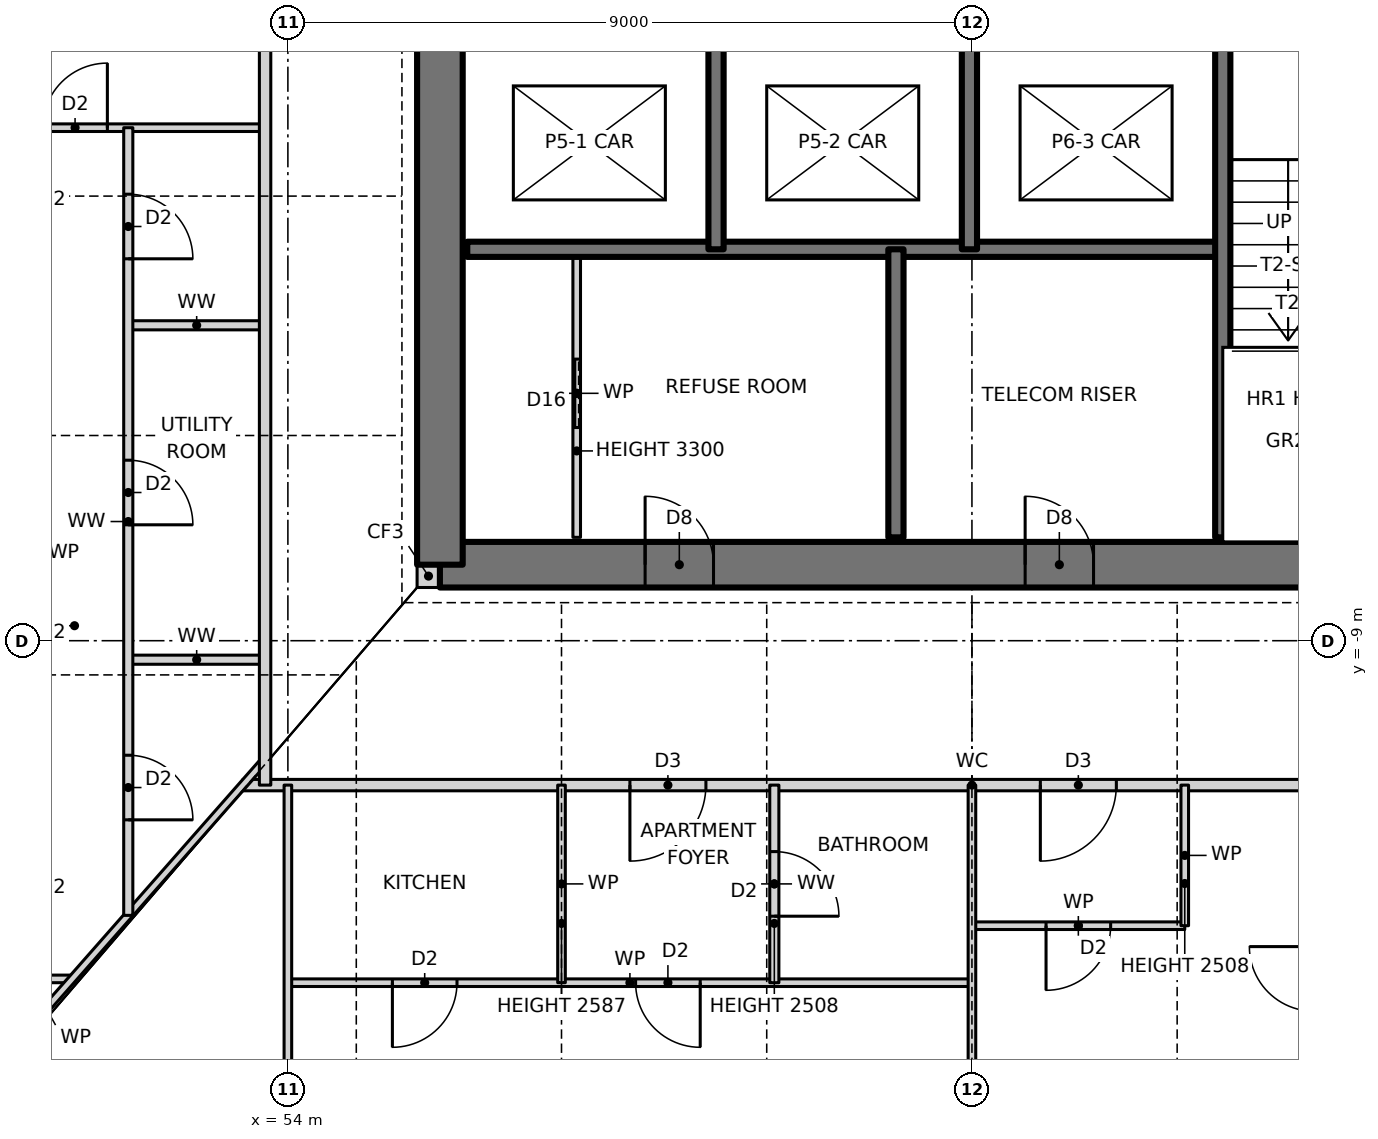
"""IFC4 building model, lengths in metres.
Left out: names, types, materials, properties, quantities, classifications, styles, units other than length and angle.
Written with IfcOpenShell. Run it as: python <this file> out.ifc"""

import sys

from ifc_helpers import new_model, si_unit, direction, frame, frame_2d, origin, place, context, subcontext, project, spatial, rectangle, extrude, element, fill, save


model = new_model("IFC4")
c1 = context("Model", 3, precision=1e-05, world=origin(), true_north=direction((0.0, 1.0)))
c2 = subcontext(c1, "Body", "Model", "MODEL_VIEW")
j1 = project(units=[si_unit("LENGTHUNIT", "METRE"), si_unit("PLANEANGLEUNIT", "RADIAN")], contexts=[c1])
p1 = place(None, origin())
s1 = spatial("IfcSite", under=j1, at=p1, CompositionType="ELEMENT")
p2 = place(p1, origin())
s2 = spatial("IfcBuilding", under=s1, at=p2, CompositionType="ELEMENT")
p3 = place(p2, frame((0.0, 0.0, 64.0)))
s3 = spatial("IfcBuildingStorey", under=s2, at=p3, CompositionType="ELEMENT", Elevation=64.0)
p4 = place(p3, frame((55.7, -8.15, 0.0), z_axis=(0.0, 0.0, 1.0), x_axis=(1.0, 0.0, 0.0)))
e1 = element("IfcWall", 1, at=p4, inside=s3, PredefinedType="SOLIDWALL", context=c2, shape_type="SweptSolid", body=[
    extrude(rectangle(XDim=0.3, YDim=0.3, at=frame_2d((0.15, 0.0))), origin(), (0.0, 0.0, 1.0), 3.5),
])
p5 = place(p3, frame((56.0, -8.0, 0.0), z_axis=(0.0, 0.0, 1.0), x_axis=(1.0, 0.0, 0.0)))
e2 = element("IfcWall", 2, at=p5, inside=s3, PredefinedType="SHEAR", context=c2, shape_type="SweptSolid", body=[
    extrude(rectangle(XDim=14.0, YDim=0.6, at=frame_2d((7.0, 0.0))), origin(), (0.0, 0.0, 1.0), 3.5),
])
p6 = place(p5, frame((2.7, 0.0, 0.0)))
e3 = element("IfcOpeningElement", 3, at=p6, cuts=e2, PredefinedType="OPENING", context=c2, shape_type="SweptSolid", body=[
    extrude(rectangle(XDim=0.9, YDim=2.1, at=frame_2d((0.45, 1.05))), frame((0.0, 0.31, 0.0), z_axis=(0.0, -1.0, 0.0), x_axis=(1.0, 0.0, 0.0)), (0.0, 0.0, 1.0), 0.62),
])
p7 = place(p5, frame((7.7, 0.0, 0.0)))
e4 = element("IfcOpeningElement", 4, at=p7, cuts=e2, PredefinedType="OPENING", context=c2, shape_type="SweptSolid", body=[
    extrude(rectangle(XDim=0.9, YDim=2.1, at=frame_2d((0.45, 1.05))), frame((0.0, 0.31, 0.0), z_axis=(0.0, -1.0, 0.0), x_axis=(1.0, 0.0, 0.0)), (0.0, 0.0, 1.0), 0.62),
])
p8 = place(p3, frame((56.0, 8.0, 0.0), z_axis=(0.0, 0.0, 1.0), x_axis=(0.0, -1.0, 0.0)))
e5 = element("IfcWall", 5, at=p8, inside=s3, PredefinedType="SHEAR", context=c2, shape_type="SweptSolid", body=[
    extrude(rectangle(XDim=16.0, YDim=0.6, at=frame_2d((8.0, 0.0))), origin(), (0.0, 0.0, 1.0), 3.5),
])
p9 = place(p8, frame((7.5, 0.0, 0.0)))
e6 = element("IfcOpeningElement", 6, at=p9, cuts=e5, PredefinedType="OPENING", context=c2, shape_type="SweptSolid", body=[
    extrude(rectangle(XDim=1.0, YDim=2.1, at=frame_2d((0.5, 1.05))), frame((0.0, 0.31, 0.0), z_axis=(0.0, -1.0, 0.0), x_axis=(1.0, 0.0, 0.0)), (0.0, 0.0, 1.0), 0.62),
])
p10 = place(p3, frame((54.0, -13.5, 0.0), z_axis=(0.0, 0.0, 1.0), x_axis=(1.0, 0.0, 0.0)))
e7 = element("IfcWall", 7, at=p10, inside=s3, PredefinedType="PARTITIONING", context=c2, shape_type="SweptSolid", body=[
    extrude(rectangle(XDim=9.0, YDim=0.1, at=frame_2d((4.5, 0.0))), origin(), (0.0, 0.0, 1.0), 3.27),
])
p11 = place(p10, frame((1.375, 0.0, 0.0)))
e8 = element("IfcOpeningElement", 8, at=p11, cuts=e7, PredefinedType="OPENING", context=c2, shape_type="SweptSolid", body=[
    extrude(rectangle(XDim=0.85, YDim=2.1, at=frame_2d((0.425, 1.05))), frame((0.0, 0.06, 0.0), z_axis=(0.0, -1.0, 0.0), x_axis=(1.0, 0.0, 0.0)), (0.0, 0.0, 1.0), 0.12),
])
p12 = place(p10, frame((4.575, 0.0, 0.0)))
e9 = element("IfcOpeningElement", 9, at=p12, cuts=e7, PredefinedType="OPENING", context=c2, shape_type="SweptSolid", body=[
    extrude(rectangle(XDim=0.85, YDim=2.1, at=frame_2d((0.425, 1.05))), frame((0.0, 0.06, 0.0), z_axis=(0.0, -1.0, 0.0), x_axis=(1.0, 0.0, 0.0)), (0.0, 0.0, 1.0), 0.12),
])
p13 = place(p3, frame((50.5, -13.45, 0.0), z_axis=(0.0, 0.0, 1.0), x_axis=(1.0, 0.0, 0.0)))
e10 = element("IfcWall", 10, at=p13, inside=s3, PredefinedType="PARTITIONING", context=c2, shape_type="SweptSolid", body=[
    extrude(rectangle(XDim=0.664, YDim=0.1, at=frame_2d((0.332, 0.0))), origin(), (0.0, 0.0, 1.0), 3.27),
])
p14 = place(p3, frame((63.0, -12.75, 0.0), z_axis=(0.0, 0.0, 1.0), x_axis=(1.0, 0.0, 0.0)))
e11 = element("IfcWall", 11, at=p14, inside=s3, PredefinedType="PARTITIONING", context=c2, shape_type="SweptSolid", body=[
    extrude(rectangle(XDim=2.8, YDim=0.1, at=frame_2d((1.4, 0.0))), origin(), (0.0, 0.0, 1.0), 3.27),
])
p15 = place(p14, frame((0.975, 0.0, 0.0)))
e12 = element("IfcOpeningElement", 12, at=p15, cuts=e11, PredefinedType="OPENING", context=c2, shape_type="SweptSolid", body=[
    extrude(rectangle(XDim=0.85, YDim=2.1, at=frame_2d((0.425, 1.05))), frame((0.0, 0.06, 0.0), z_axis=(0.0, -1.0, 0.0), x_axis=(1.0, 0.0, 0.0)), (0.0, 0.0, 1.0), 0.12),
])
p16 = place(p3, frame((53.408, -10.9, 0.0), z_axis=(0.0, 0.0, 1.0), x_axis=(1.0, 0.0, 0.0)))
e13 = element("IfcWall", 13, at=p16, inside=s3, PredefinedType="PARTITIONING", context=c2, shape_type="SweptSolid", body=[
    extrude(rectangle(XDim=19.184, YDim=0.15, at=frame_2d((9.592, 0.0))), origin(), (0.0, 0.0, 1.0), 3.27),
])
p17 = place(p16, frame((5.092, 0.0, 0.0)))
e14 = element("IfcOpeningElement", 14, at=p17, cuts=e13, PredefinedType="OPENING", context=c2, shape_type="SweptSolid", body=[
    extrude(rectangle(XDim=1.0, YDim=2.1, at=frame_2d((0.5, 1.05))), frame((0.0, 0.085, 0.0), z_axis=(0.0, -1.0, 0.0), x_axis=(1.0, 0.0, 0.0)), (0.0, 0.0, 1.0), 0.17),
])
p18 = place(p16, frame((10.492, 0.0, 0.0)))
e15 = element("IfcOpeningElement", 15, at=p18, cuts=e13, PredefinedType="OPENING", context=c2, shape_type="SweptSolid", body=[
    extrude(rectangle(XDim=1.0, YDim=2.1, at=frame_2d((0.5, 1.05))), frame((0.0, 0.085, 0.0), z_axis=(0.0, -1.0, 0.0), x_axis=(1.0, 0.0, 0.0)), (0.0, 0.0, 1.0), 0.17),
])
for number, where, z_axis, x_axis in (
    (16, (51.9, -9.25, 0.0), (0.0, 0.0, 1.0), (1.0, 0.0, 0.0)),
    (17, (51.9, -4.85, 0.0), (0.0, 0.0, 1.0), (1.0, 0.0, 0.0)),
):
    element("IfcWall", number, at=place(p3, frame(where, z_axis=z_axis, x_axis=x_axis)), inside=s3, PredefinedType="PARTITIONING", context=c2, shape_type="SweptSolid", body=[
        extrude(rectangle(XDim=1.8, YDim=0.12, at=frame_2d((0.9, 0.0))), origin(), (0.0, 0.0, 1.0), 3.27),
    ])
p19 = place(p3, frame((56.36, -3.85, 0.0), z_axis=(0.0, 0.0, 1.0), x_axis=(1.0, 0.0, 0.0)))
e18 = element("IfcWall", 18, at=p19, inside=s3, PredefinedType="SOLIDWALL", context=c2, shape_type="SweptSolid", body=[
    extrude(rectangle(XDim=9.94, YDim=0.2, at=frame_2d((4.97, 0.0))), origin(), (0.0, 0.0, 1.0), 3.5),
])
p20 = place(p3, frame((46.56, -2.25, 0.0), z_axis=(0.0, 0.0, 1.0), x_axis=(1.0, 0.0, 0.0)))
e19 = element("IfcWall", 19, at=p20, inside=s3, PredefinedType="PARTITIONING", context=c2, shape_type="SweptSolid", body=[
    extrude(rectangle(XDim=7.14, YDim=0.1, at=frame_2d((3.57, 0.0))), origin(), (0.0, 0.0, 1.0), 3.27),
])
p21 = place(p20, frame((4.215, 0.0, 0.0)))
e20 = element("IfcOpeningElement", 20, at=p21, cuts=e19, PredefinedType="OPENING", context=c2, shape_type="SweptSolid", body=[
    extrude(rectangle(XDim=0.85, YDim=2.1, at=frame_2d((0.425, 1.05))), frame((0.0, 0.06, 0.0), z_axis=(0.0, -1.0, 0.0), x_axis=(1.0, 0.0, 0.0)), (0.0, 0.0, 1.0), 0.12),
])
p22 = place(p3, frame((47.944, -17.109, 0.0), z_axis=(0.0, 0.0, 1.0), x_axis=(0.660612734851, 0.750726857487, 0.0)))
e21 = element("IfcWall", 21, at=p22, inside=s3, PredefinedType="PARTITIONING", context=c2, shape_type="SweptSolid", body=[
    extrude(rectangle(XDim=8.713, YDim=0.1, at=frame_2d((4.356, 0.0))), origin(), (0.0, 0.0, 1.0), 2.429),
])
p23 = place(p3, frame((66.3, -7.64, 0.0), z_axis=(0.0, 0.0, 1.0), x_axis=(0.0, 1.0, 0.0)))
e22 = element("IfcWall", 22, at=p23, inside=s3, PredefinedType="SOLIDWALL", context=c2, shape_type="SweptSolid", body=[
    extrude(rectangle(XDim=11.49, YDim=0.2, at=frame_2d((5.745, 0.0))), origin(), (0.0, 0.0, 1.0), 3.5),
])
p24 = place(p23, frame((7.04, 0.0, 0.0)))
e23 = element("IfcOpeningElement", 23, at=p24, cuts=e22, PredefinedType="OPENING", context=c2, shape_type="SweptSolid", body=[
    extrude(rectangle(XDim=1.2, YDim=2.1, at=frame_2d((0.6, 1.05))), frame((0.0, 0.11, 0.0), z_axis=(0.0, -1.0, 0.0), x_axis=(1.0, 0.0, 0.0)), (0.0, 0.0, 1.0), 0.22),
])
p25 = place(p3, frame((65.8, -12.75, 0.0), z_axis=(0.0, 0.0, 1.0), x_axis=(0.0, 1.0, 0.0)))
e24 = element("IfcWall", 24, at=p25, inside=s3, PredefinedType="PARTITIONING", context=c2, shape_type="SweptSolid", body=[
    extrude(rectangle(XDim=1.85, YDim=0.1, at=frame_2d((0.925, 0.0))), origin(), (0.0, 0.0, 1.0), 2.508),
])
p26 = place(p3, frame((63.0, -18.69, 0.0), z_axis=(0.0, 0.0, 1.0), x_axis=(0.0, 1.0, 0.0)))
e25 = element("IfcWall", 25, at=p26, inside=s3, PredefinedType="PARTITIONING", context=c2, shape_type="SweptSolid", body=[
    extrude(rectangle(XDim=7.79, YDim=0.1, at=frame_2d((3.895, 0.0))), origin(), (0.0, 0.0, 1.0), 2.587),
])
p27 = place(p3, frame((62.967, -3.85, 0.0), z_axis=(0.0, 0.0, 1.0), x_axis=(0.0, 1.0, 0.0)))
e26 = element("IfcWall", 26, at=p27, inside=s3, PredefinedType="SOLIDWALL", context=c2, shape_type="SweptSolid", body=[
    extrude(rectangle(XDim=2.8, YDim=0.2, at=frame_2d((1.4, 0.0))), origin(), (0.0, 0.0, 1.0), 3.5),
])
p28 = place(p3, frame((62.0, -7.64, 0.0), z_axis=(0.0, 0.0, 1.0), x_axis=(0.0, 1.0, 0.0)))
e27 = element("IfcWall", 27, at=p28, inside=s3, PredefinedType="SOLIDWALL", context=c2, shape_type="SweptSolid", body=[
    extrude(rectangle(XDim=3.79, YDim=0.2, at=frame_2d((1.895, 0.0))), origin(), (0.0, 0.0, 1.0), 3.5),
])
p29 = place(p3, frame((60.4, -13.5, 0.0), z_axis=(0.0, 0.0, 1.0), x_axis=(0.0, 1.0, 0.0)))
e28 = element("IfcWall", 28, at=p29, inside=s3, PredefinedType="PARTITIONING", context=c2, shape_type="SweptSolid", body=[
    extrude(rectangle(XDim=2.6, YDim=0.12, at=frame_2d((1.3, 0.0))), origin(), (0.0, 0.0, 1.0), 2.508),
])
p30 = place(p29, frame((0.875, 0.0, 0.0)))
e29 = element("IfcOpeningElement", 29, at=p30, cuts=e28, PredefinedType="OPENING", context=c2, shape_type="SweptSolid", body=[
    extrude(rectangle(XDim=0.85, YDim=2.1, at=frame_2d((0.425, 1.05))), frame((0.0, 0.07, 0.0), z_axis=(0.0, -1.0, 0.0), x_axis=(1.0, 0.0, 0.0)), (0.0, 0.0, 1.0), 0.14),
])
p31 = place(p3, frame((59.633, -3.85, 0.0), z_axis=(0.0, 0.0, 1.0), x_axis=(0.0, 1.0, 0.0)))
e30 = element("IfcWall", 30, at=p31, inside=s3, PredefinedType="SOLIDWALL", context=c2, shape_type="SweptSolid", body=[
    extrude(rectangle(XDim=2.8, YDim=0.2, at=frame_2d((1.4, 0.0))), origin(), (0.0, 0.0, 1.0), 3.5),
])
p32 = place(p3, frame((57.8, -7.64, 0.0), z_axis=(0.0, 0.0, 1.0), x_axis=(0.0, 1.0, 0.0)))
e31 = element("IfcWall", 31, at=p32, inside=s3, PredefinedType="PARTITIONING", context=c2, shape_type="SweptSolid", body=[
    extrude(rectangle(XDim=3.79, YDim=0.1, at=frame_2d((1.895, 0.0))), origin(), (0.0, 0.0, 1.0), 3.3),
])
p33 = place(p32, frame((1.445, 0.0, 0.0)))
e32 = element("IfcOpeningElement", 32, at=p33, cuts=e31, PredefinedType="OPENING", context=c2, shape_type="SweptSolid", body=[
    extrude(rectangle(XDim=0.9, YDim=2.1, at=frame_2d((0.45, 1.05))), frame((0.0, 0.06, 0.0), z_axis=(0.0, -1.0, 0.0), x_axis=(1.0, 0.0, 0.0)), (0.0, 0.0, 1.0), 0.12),
])
p34 = place(p3, frame((57.6, -13.5, 0.0), z_axis=(0.0, 0.0, 1.0), x_axis=(0.0, 1.0, 0.0)))
e33 = element("IfcWall", 33, at=p34, inside=s3, PredefinedType="PARTITIONING", context=c2, shape_type="SweptSolid", body=[
    extrude(rectangle(XDim=2.6, YDim=0.1, at=frame_2d((1.3, 0.0))), origin(), (0.0, 0.0, 1.0), 2.587),
])
p35 = place(p3, frame((54.0, -18.69, 0.0), z_axis=(0.0, 0.0, 1.0), x_axis=(0.0, 1.0, 0.0)))
e34 = element("IfcWall", 34, at=p35, inside=s3, PredefinedType="PARTITIONING", context=c2, shape_type="SweptSolid", body=[
    extrude(rectangle(XDim=7.79, YDim=0.1, at=frame_2d((3.895, 0.0))), origin(), (0.0, 0.0, 1.0), 3.27),
])
p36 = place(p35, frame((2.17, 0.0, 0.0)))
e35 = element("IfcOpeningElement", 35, at=p36, cuts=e34, PredefinedType="OPENING", context=c2, shape_type="SweptSolid", body=[
    extrude(rectangle(XDim=0.85, YDim=2.1, at=frame_2d((0.425, 1.05))), frame((0.0, 0.06, 0.0), z_axis=(0.0, -1.0, 0.0), x_axis=(1.0, 0.0, 0.0)), (0.0, 0.0, 1.0), 0.12),
])
p37 = place(p3, frame((53.7, -10.9, 0.0), z_axis=(0.0, 0.0, 1.0), x_axis=(0.0, 1.0, 0.0)))
e36 = element("IfcWall", 36, at=p37, inside=s3, PredefinedType="PARTITIONING", context=c2, shape_type="SweptSolid", body=[
    extrude(rectangle(XDim=21.468, YDim=0.15, at=frame_2d((10.734, 0.0))), origin(), (0.0, 0.0, 1.0), 3.27),
])
p38 = place(p37, frame((16.65, 0.0, 0.0)))
e37 = element("IfcOpeningElement", 37, at=p38, cuts=e36, PredefinedType="OPENING", context=c2, shape_type="SweptSolid", body=[
    extrude(rectangle(XDim=1.0, YDim=2.1, at=frame_2d((0.5, 1.05))), frame((0.0, 0.085, 0.0), z_axis=(0.0, -1.0, 0.0), x_axis=(1.0, 0.0, 0.0)), (0.0, 0.0, 1.0), 0.17),
])
p39 = place(p37, frame((11.25, 0.0, 0.0)))
e38 = element("IfcOpeningElement", 38, at=p39, cuts=e36, PredefinedType="OPENING", context=c2, shape_type="SweptSolid", body=[
    extrude(rectangle(XDim=1.0, YDim=2.1, at=frame_2d((0.5, 1.05))), frame((0.0, 0.085, 0.0), z_axis=(0.0, -1.0, 0.0), x_axis=(1.0, 0.0, 0.0)), (0.0, 0.0, 1.0), 0.17),
])
p40 = place(p3, frame((51.9, -12.614, 0.0), z_axis=(0.0, 0.0, 1.0), x_axis=(0.0, 1.0, 0.0)))
e39 = element("IfcWall", 39, at=p40, inside=s3, PredefinedType="PARTITIONING", context=c2, shape_type="SweptSolid", body=[
    extrude(rectangle(XDim=10.364, YDim=0.12, at=frame_2d((5.182, 0.0))), origin(), (0.0, 0.0, 1.0), 3.27),
])
p41 = place(p40, frame((8.639, 0.0, 0.0)))
e40 = element("IfcOpeningElement", 40, at=p41, cuts=e39, PredefinedType="OPENING", context=c2, shape_type="SweptSolid", body=[
    extrude(rectangle(XDim=0.85, YDim=2.1, at=frame_2d((0.425, 1.05))), frame((0.0, 0.07, 0.0), z_axis=(0.0, -1.0, 0.0), x_axis=(1.0, 0.0, 0.0)), (0.0, 0.0, 1.0), 0.14),
])
p42 = place(p40, frame((5.139, 0.0, 0.0)))
e41 = element("IfcOpeningElement", 41, at=p42, cuts=e39, PredefinedType="OPENING", context=c2, shape_type="SweptSolid", body=[
    extrude(rectangle(XDim=0.85, YDim=2.1, at=frame_2d((0.425, 1.05))), frame((0.0, 0.07, 0.0), z_axis=(0.0, -1.0, 0.0), x_axis=(1.0, 0.0, 0.0)), (0.0, 0.0, 1.0), 0.14),
])
p43 = place(p40, frame((1.257, 0.0, 0.0)))
e42 = element("IfcOpeningElement", 42, at=p43, cuts=e39, PredefinedType="OPENING", context=c2, shape_type="SweptSolid", body=[
    extrude(rectangle(XDim=0.85, YDim=2.1, at=frame_2d((0.425, 1.05))), frame((0.0, 0.07, 0.0), z_axis=(0.0, -1.0, 0.0), x_axis=(1.0, 0.0, 0.0)), (0.0, 0.0, 1.0), 0.14),
])
p44 = place(p33, origin())
e43 = element("IfcDoor", 43, at=p44, inside=s3, OperationType="SLIDING_TO_LEFT", PredefinedType="DOOR", context=c2, shape_type="SweptSolid", body=[
    extrude(rectangle(XDim=0.9, YDim=2.1, at=frame_2d((0.45, 1.05))), frame((0.0, 0.025, 0.0), z_axis=(0.0, -1.0, 0.0), x_axis=(1.0, 0.0, 0.0)), (0.0, 0.0, 1.0), 0.05),
])
fill(e32, e43)
p45 = place(p11, frame((0.85, 0.0, 0.0), z_axis=(0.0, 0.0, 1.0), x_axis=(-1.0, 0.0, 0.0)))
e44 = element("IfcDoor", 44, at=p45, inside=s3, OperationType="SINGLE_SWING_RIGHT", PredefinedType="DOOR", context=c2, shape_type="SweptSolid", body=[
    extrude(rectangle(XDim=0.85, YDim=2.1, at=frame_2d((0.425, 1.05))), frame((0.0, 0.025, 0.0), z_axis=(0.0, -1.0, 0.0), x_axis=(1.0, 0.0, 0.0)), (0.0, 0.0, 1.0), 0.05),
])
fill(e8, e44)
p46 = place(p17, frame((1.0, 0.0, 0.0), z_axis=(0.0, 0.0, 1.0), x_axis=(-1.0, 0.0, 0.0)))
e45 = element("IfcDoor", 45, at=p46, inside=s3, OperationType="SINGLE_SWING_RIGHT", PredefinedType="DOOR", context=c2, shape_type="SweptSolid", body=[
    extrude(rectangle(XDim=1.0, YDim=2.1, at=frame_2d((0.5, 1.05))), frame((0.0, 0.025, 0.0), z_axis=(0.0, -1.0, 0.0), x_axis=(1.0, 0.0, 0.0)), (0.0, 0.0, 1.0), 0.05),
])
fill(e14, e45)
p47 = place(p12, frame((0.85, 0.0, 0.0), z_axis=(0.0, 0.0, 1.0), x_axis=(-1.0, 0.0, 0.0)))
e46 = element("IfcDoor", 46, at=p47, inside=s3, OperationType="SINGLE_SWING_LEFT", PredefinedType="DOOR", context=c2, shape_type="SweptSolid", body=[
    extrude(rectangle(XDim=0.85, YDim=2.1, at=frame_2d((0.425, 1.05))), frame((0.0, 0.025, 0.0), z_axis=(0.0, -1.0, 0.0), x_axis=(1.0, 0.0, 0.0)), (0.0, 0.0, 1.0), 0.05),
])
fill(e9, e46)
p48 = place(p30, frame((0.85, 0.0, 0.0), z_axis=(0.0, 0.0, 1.0), x_axis=(-1.0, 0.0, 0.0)))
e47 = element("IfcDoor", 47, at=p48, inside=s3, OperationType="SINGLE_SWING_RIGHT", PredefinedType="DOOR", context=c2, shape_type="SweptSolid", body=[
    extrude(rectangle(XDim=0.85, YDim=2.1, at=frame_2d((0.425, 1.05))), frame((0.0, 0.025, 0.0), z_axis=(0.0, -1.0, 0.0), x_axis=(1.0, 0.0, 0.0)), (0.0, 0.0, 1.0), 0.05),
])
fill(e29, e47)
p49 = place(p18, frame((1.0, 0.0, 0.0), z_axis=(0.0, 0.0, 1.0), x_axis=(-1.0, 0.0, 0.0)))
e48 = element("IfcDoor", 48, at=p49, inside=s3, OperationType="SINGLE_SWING_RIGHT", PredefinedType="DOOR", context=c2, shape_type="SweptSolid", body=[
    extrude(rectangle(XDim=1.0, YDim=2.1, at=frame_2d((0.5, 1.05))), frame((0.0, 0.025, 0.0), z_axis=(0.0, -1.0, 0.0), x_axis=(1.0, 0.0, 0.0)), (0.0, 0.0, 1.0), 0.05),
])
fill(e15, e48)
p50 = place(p15, frame((0.85, 0.0, 0.0), z_axis=(0.0, 0.0, 1.0), x_axis=(-1.0, 0.0, 0.0)))
e49 = element("IfcDoor", 49, at=p50, inside=s3, OperationType="SINGLE_SWING_RIGHT", PredefinedType="DOOR", context=c2, shape_type="SweptSolid", body=[
    extrude(rectangle(XDim=0.85, YDim=2.1, at=frame_2d((0.425, 1.05))), frame((0.0, 0.025, 0.0), z_axis=(0.0, -1.0, 0.0), x_axis=(1.0, 0.0, 0.0)), (0.0, 0.0, 1.0), 0.05),
])
fill(e12, e49)
p51 = place(p21, origin())
e50 = element("IfcDoor", 50, at=p51, inside=s3, OperationType="SINGLE_SWING_RIGHT", PredefinedType="DOOR", context=c2, shape_type="SweptSolid", body=[
    extrude(rectangle(XDim=0.85, YDim=2.1, at=frame_2d((0.425, 1.05))), frame((0.0, 0.025, 0.0), z_axis=(0.0, -1.0, 0.0), x_axis=(1.0, 0.0, 0.0)), (0.0, 0.0, 1.0), 0.05),
])
fill(e20, e50)
p52 = place(p41, frame((0.85, 0.0, 0.0), z_axis=(0.0, 0.0, 1.0), x_axis=(-1.0, 0.0, 0.0)))
e51 = element("IfcDoor", 51, at=p52, inside=s3, OperationType="SINGLE_SWING_RIGHT", PredefinedType="DOOR", context=c2, shape_type="SweptSolid", body=[
    extrude(rectangle(XDim=0.85, YDim=2.1, at=frame_2d((0.425, 1.05))), frame((0.0, 0.025, 0.0), z_axis=(0.0, -1.0, 0.0), x_axis=(1.0, 0.0, 0.0)), (0.0, 0.0, 1.0), 0.05),
])
fill(e40, e51)
p53 = place(p42, frame((0.85, 0.0, 0.0), z_axis=(0.0, 0.0, 1.0), x_axis=(-1.0, 0.0, 0.0)))
e52 = element("IfcDoor", 52, at=p53, inside=s3, OperationType="SINGLE_SWING_RIGHT", PredefinedType="DOOR", context=c2, shape_type="SweptSolid", body=[
    extrude(rectangle(XDim=0.85, YDim=2.1, at=frame_2d((0.425, 1.05))), frame((0.0, 0.025, 0.0), z_axis=(0.0, -1.0, 0.0), x_axis=(1.0, 0.0, 0.0)), (0.0, 0.0, 1.0), 0.05),
])
fill(e41, e52)
p54 = place(p43, frame((0.85, 0.0, 0.0), z_axis=(0.0, 0.0, 1.0), x_axis=(-1.0, 0.0, 0.0)))
e53 = element("IfcDoor", 53, at=p54, inside=s3, OperationType="SINGLE_SWING_RIGHT", PredefinedType="DOOR", context=c2, shape_type="SweptSolid", body=[
    extrude(rectangle(XDim=0.85, YDim=2.1, at=frame_2d((0.425, 1.05))), frame((0.0, 0.025, 0.0), z_axis=(0.0, -1.0, 0.0), x_axis=(1.0, 0.0, 0.0)), (0.0, 0.0, 1.0), 0.05),
])
fill(e42, e53)
p55 = place(p6, origin())
e54 = element("IfcDoor", 54, at=p55, inside=s3, OperationType="SINGLE_SWING_LEFT", PredefinedType="DOOR", context=c2, shape_type="SweptSolid", body=[
    extrude(rectangle(XDim=0.9, YDim=2.1, at=frame_2d((0.45, 1.05))), frame((0.0, 0.025, 0.0), z_axis=(0.0, -1.0, 0.0), x_axis=(1.0, 0.0, 0.0)), (0.0, 0.0, 1.0), 0.05),
])
fill(e3, e54)
p56 = place(p7, origin())
e55 = element("IfcDoor", 55, at=p56, inside=s3, OperationType="SINGLE_SWING_LEFT", PredefinedType="DOOR", context=c2, shape_type="SweptSolid", body=[
    extrude(rectangle(XDim=0.9, YDim=2.1, at=frame_2d((0.45, 1.05))), frame((0.0, 0.025, 0.0), z_axis=(0.0, -1.0, 0.0), x_axis=(1.0, 0.0, 0.0)), (0.0, 0.0, 1.0), 0.05),
])
fill(e4, e55)
save(model, sys.argv[1])
